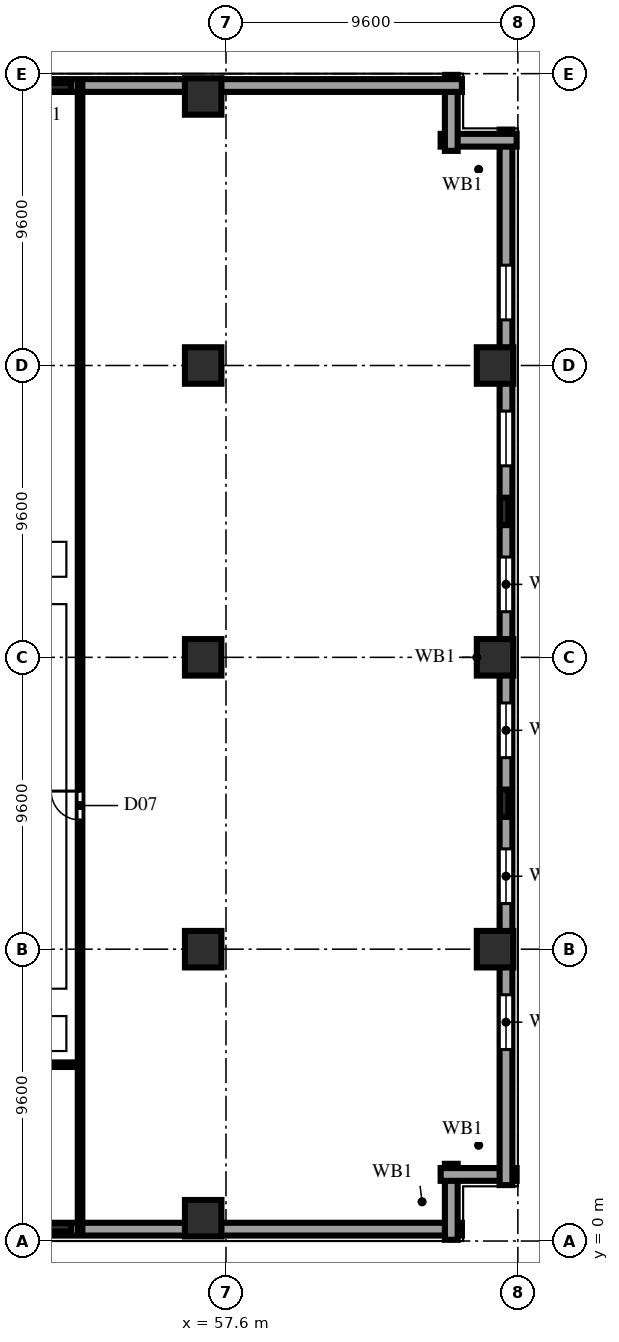
"""IFC4 building model, lengths in metres.
Left out: names, types, materials, properties, quantities, classifications, styles, units other than length and angle.
Written with IfcOpenShell. Run it as: python <this file> out.ifc"""

import sys

from ifc_helpers import new_model, si_unit, direction, frame, frame_2d, origin, origin_2d, place, context, subcontext, project, spatial, rectangle, extrude, element, fill, save


model = new_model("IFC4")
c1 = context("Model", 3, precision=1e-05, world=origin(), true_north=direction((0.0, 1.0)))
c2 = subcontext(c1, "Body", "Model", "MODEL_VIEW")
j1 = project(units=[si_unit("LENGTHUNIT", "METRE"), si_unit("PLANEANGLEUNIT", "RADIAN")], contexts=[c1])
p1 = place(None, origin())
s1 = spatial("IfcSite", under=j1, at=p1, CompositionType="ELEMENT")
p2 = place(p1, origin())
s2 = spatial("IfcBuilding", under=s1, at=p2, CompositionType="ELEMENT")
p3 = place(p2, frame((0.0, 0.0, 39.4)))
s3 = spatial("IfcBuildingStorey", under=s2, at=p3, CompositionType="ELEMENT", Elevation=39.4)
for number, where, z_axis, x_axis in (
    (1, (56.85, 0.75, 0.0), (0.0, 0.0, 1.0), (1.0, 0.0, 0.0)),
    (2, (56.85, 9.6, 0.0), (0.0, 0.0, 1.0), (1.0, 0.0, 0.0)),
    (3, (56.85, 19.2, 0.0), (0.0, 0.0, 1.0), (1.0, 0.0, 0.0)),
    (4, (56.85, 28.8, 0.0), (0.0, 0.0, 1.0), (1.0, 0.0, 0.0)),
    (5, (56.85, 37.65, 0.0), (0.0, 0.0, 1.0), (1.0, 0.0, 0.0)),
    (6, (66.45, 9.6, 0.0), (0.0, 0.0, 1.0), (1.0, 0.0, 0.0)),
    (7, (66.45, 19.2, 0.0), (0.0, 0.0, 1.0), (1.0, 0.0, 0.0)),
    (8, (66.45, 28.8, 0.0), (0.0, 0.0, 1.0), (1.0, 0.0, 0.0)),
):
    element("IfcColumn", number, at=place(p3, frame(where, z_axis=z_axis, x_axis=x_axis)), inside=s3, PredefinedType="COLUMN", context=c2, shape_type="SweptSolid", body=[
        extrude(rectangle(XDim=1.2, YDim=1.2, at=origin_2d()), origin(), (0.0, 0.0, 1.0), 3.8),
    ])
for number, where, z_axis, x_axis in (
    (9, (52.05, 0.45, 0.0), (0.0, 0.0, 1.0), (1.0, 0.0, 0.0)),
    (10, (66.75, 14.4, 0.0), (0.0, 0.0, 1.0), (0.0, 1.0, 0.0)),
    (11, (66.75, 24.0, 0.0), (0.0, 0.0, 1.0), (0.0, 1.0, 0.0)),
    (12, (52.05, 37.95, 0.0), (0.0, 0.0, 1.0), (1.0, 0.0, 0.0)),
):
    element("IfcColumn", number, at=place(p3, frame(where, z_axis=z_axis, x_axis=x_axis)), inside=s3, PredefinedType="PILASTER", context=c2, shape_type="SweptSolid", body=[
        extrude(rectangle(XDim=0.9, YDim=0.28, at=origin_2d()), origin(), (0.0, 0.0, 1.0), 3.8),
    ])
p4 = place(p3, frame((1.84, 0.39, 0.0), z_axis=(0.0, 0.0, 1.0), x_axis=(1.0, 0.0, 0.0)))
e13 = element("IfcWall", 13, at=p4, inside=s3, PredefinedType="SOLIDWALL", context=c2, shape_type="SweptSolid", body=[
    extrude(rectangle(XDim=63.52, YDim=0.42, at=frame_2d((31.76, 0.0))), origin(), (0.0, 0.0, 1.0), 3.54),
])
p5 = place(p4, frame((4.16, 0.0, 0.85)))
e14 = element("IfcOpeningElement", 14, at=p5, cuts=e13, PredefinedType="OPENING", context=c2, shape_type="SweptSolid", body=[
    extrude(rectangle(XDim=2.4, YDim=1.85, at=frame_2d((1.2, 0.925))), frame((0.0, 0.222, 0.0), z_axis=(0.0, -1.0, 0.0), x_axis=(1.0, 0.0, 0.0)), (0.0, 0.0, 1.0), 0.444),
])
p6 = place(p4, frame((13.76, 0.0, 0.85)))
e15 = element("IfcOpeningElement", 15, at=p6, cuts=e13, PredefinedType="OPENING", context=c2, shape_type="SweptSolid", body=[
    extrude(rectangle(XDim=2.4, YDim=1.85, at=frame_2d((1.2, 0.925))), frame((0.0, 0.222, 0.0), z_axis=(0.0, -1.0, 0.0), x_axis=(1.0, 0.0, 0.0)), (0.0, 0.0, 1.0), 0.444),
])
p7 = place(p4, frame((18.56, 0.0, 0.85)))
e16 = element("IfcOpeningElement", 16, at=p7, cuts=e13, PredefinedType="OPENING", context=c2, shape_type="SweptSolid", body=[
    extrude(rectangle(XDim=2.4, YDim=1.85, at=frame_2d((1.2, 0.925))), frame((0.0, 0.222, 0.0), z_axis=(0.0, -1.0, 0.0), x_axis=(1.0, 0.0, 0.0)), (0.0, 0.0, 1.0), 0.444),
])
p8 = place(p4, frame((28.16, 0.0, 0.85)))
e17 = element("IfcOpeningElement", 17, at=p8, cuts=e13, PredefinedType="OPENING", context=c2, shape_type="SweptSolid", body=[
    extrude(rectangle(XDim=2.4, YDim=1.85, at=frame_2d((1.2, 0.925))), frame((0.0, 0.222, 0.0), z_axis=(0.0, -1.0, 0.0), x_axis=(1.0, 0.0, 0.0)), (0.0, 0.0, 1.0), 0.444),
])
for number, where, z_axis, x_axis in (
    (18, (65.01, 0.04, 0.0), (0.0, 0.0, 1.0), (0.0, 1.0, 0.0)),
    (19, (64.66, 2.19, 0.0), (0.0, 0.0, 1.0), (1.0, 0.0, 0.0)),
):
    element("IfcWall", number, at=place(p3, frame(where, z_axis=z_axis, x_axis=x_axis)), inside=s3, PredefinedType="SOLIDWALL", context=c2, shape_type="SweptSolid", body=[
        extrude(rectangle(XDim=2.5, YDim=0.42, at=frame_2d((1.25, 0.0))), origin(), (0.0, 0.0, 1.0), 3.54),
    ])
p9 = place(p3, frame((66.81, 1.84, 0.0), z_axis=(0.0, 0.0, 1.0), x_axis=(0.0, 1.0, 0.0)))
e20 = element("IfcWall", 20, at=p9, inside=s3, PredefinedType="SOLIDWALL", context=c2, shape_type="SweptSolid", body=[
    extrude(rectangle(XDim=34.72, YDim=0.42, at=frame_2d((17.36, 0.0))), origin(), (0.0, 0.0, 1.0), 3.54),
])
p10 = place(p9, frame((4.46, 0.0, 0.85)))
e21 = element("IfcOpeningElement", 21, at=p10, cuts=e20, PredefinedType="OPENING", context=c2, shape_type="SweptSolid", body=[
    extrude(rectangle(XDim=1.8, YDim=1.85, at=frame_2d((0.9, 0.925))), frame((0.0, 0.222, 0.0), z_axis=(0.0, -1.0, 0.0), x_axis=(1.0, 0.0, 0.0)), (0.0, 0.0, 1.0), 0.444),
])
p11 = place(p9, frame((9.26, 0.0, 0.85)))
e22 = element("IfcOpeningElement", 22, at=p11, cuts=e20, PredefinedType="OPENING", context=c2, shape_type="SweptSolid", body=[
    extrude(rectangle(XDim=1.8, YDim=1.85, at=frame_2d((0.9, 0.925))), frame((0.0, 0.222, 0.0), z_axis=(0.0, -1.0, 0.0), x_axis=(1.0, 0.0, 0.0)), (0.0, 0.0, 1.0), 0.444),
])
p12 = place(p9, frame((14.06, 0.0, 0.85)))
e23 = element("IfcOpeningElement", 23, at=p12, cuts=e20, PredefinedType="OPENING", context=c2, shape_type="SweptSolid", body=[
    extrude(rectangle(XDim=1.8, YDim=1.85, at=frame_2d((0.9, 0.925))), frame((0.0, 0.222, 0.0), z_axis=(0.0, -1.0, 0.0), x_axis=(1.0, 0.0, 0.0)), (0.0, 0.0, 1.0), 0.444),
])
p13 = place(p9, frame((18.86, 0.0, 0.85)))
e24 = element("IfcOpeningElement", 24, at=p13, cuts=e20, PredefinedType="OPENING", context=c2, shape_type="SweptSolid", body=[
    extrude(rectangle(XDim=1.8, YDim=1.85, at=frame_2d((0.9, 0.925))), frame((0.0, 0.222, 0.0), z_axis=(0.0, -1.0, 0.0), x_axis=(1.0, 0.0, 0.0)), (0.0, 0.0, 1.0), 0.444),
])
p14 = place(p9, frame((23.66, 0.0, 0.85)))
e25 = element("IfcOpeningElement", 25, at=p14, cuts=e20, PredefinedType="OPENING", context=c2, shape_type="SweptSolid", body=[
    extrude(rectangle(XDim=1.8, YDim=1.85, at=frame_2d((0.9, 0.925))), frame((0.0, 0.222, 0.0), z_axis=(0.0, -1.0, 0.0), x_axis=(1.0, 0.0, 0.0)), (0.0, 0.0, 1.0), 0.444),
])
p15 = place(p9, frame((28.46, 0.0, 0.85)))
e26 = element("IfcOpeningElement", 26, at=p15, cuts=e20, PredefinedType="OPENING", context=c2, shape_type="SweptSolid", body=[
    extrude(rectangle(XDim=1.8, YDim=1.85, at=frame_2d((0.9, 0.925))), frame((0.0, 0.222, 0.0), z_axis=(0.0, -1.0, 0.0), x_axis=(1.0, 0.0, 0.0)), (0.0, 0.0, 1.0), 0.444),
])
for number, where, z_axis, x_axis in (
    (27, (67.16, 36.21, 0.0), (0.0, 0.0, 1.0), (-1.0, 0.0, 0.0)),
    (28, (65.01, 35.86, 0.0), (0.0, 0.0, 1.0), (0.0, 1.0, 0.0)),
):
    element("IfcWall", number, at=place(p3, frame(where, z_axis=z_axis, x_axis=x_axis)), inside=s3, PredefinedType="SOLIDWALL", context=c2, shape_type="SweptSolid", body=[
        extrude(rectangle(XDim=2.5, YDim=0.42, at=frame_2d((1.25, 0.0))), origin(), (0.0, 0.0, 1.0), 3.54),
    ])
p16 = place(p3, frame((65.36, 38.01, 0.0), z_axis=(0.0, 0.0, 1.0), x_axis=(-1.0, 0.0, 0.0)))
e29 = element("IfcWall", 29, at=p16, inside=s3, PredefinedType="SOLIDWALL", context=c2, shape_type="SweptSolid", body=[
    extrude(rectangle(XDim=27.7, YDim=0.42, at=frame_2d((13.85, 0.0))), origin(), (0.0, 0.0, 1.0), 3.54),
])
p17 = place(p3, frame((0.22, 5.8, 0.0), z_axis=(0.0, 0.0, 1.0), x_axis=(1.0, 0.0, 0.0)))
e30 = element("IfcWall", 30, at=p17, inside=s3, PredefinedType="PARTITIONING", context=c2, shape_type="SweptSolid", body=[
    extrude(rectangle(XDim=52.58, YDim=0.15, at=frame_2d((26.29, 0.0))), origin(), (0.0, 0.0, 1.0), 3.54),
])
p18 = place(p17, frame((10.18, 0.0, 0.0)))
e31 = element("IfcOpeningElement", 31, at=p18, cuts=e30, PredefinedType="OPENING", context=c2, shape_type="SweptSolid", body=[
    extrude(rectangle(XDim=0.95, YDim=2.15, at=frame_2d((0.475, 1.075))), frame((0.0, 0.087, 0.0), z_axis=(0.0, -1.0, 0.0), x_axis=(1.0, 0.0, 0.0)), (0.0, 0.0, 1.0), 0.174),
])
p19 = place(p17, frame((13.58, 0.0, 0.0)))
e32 = element("IfcOpeningElement", 32, at=p19, cuts=e30, PredefinedType="OPENING", context=c2, shape_type="SweptSolid", body=[
    extrude(rectangle(XDim=0.95, YDim=2.15, at=frame_2d((0.475, 1.075))), frame((0.0, 0.087, 0.0), z_axis=(0.0, -1.0, 0.0), x_axis=(1.0, 0.0, 0.0)), (0.0, 0.0, 1.0), 0.174),
])
p20 = place(p17, frame((32.53, 0.0, 0.0)))
e33 = element("IfcOpeningElement", 33, at=p20, cuts=e30, PredefinedType="OPENING", context=c2, shape_type="SweptSolid", body=[
    extrude(rectangle(XDim=0.95, YDim=2.15, at=frame_2d((0.475, 1.075))), frame((0.0, 0.087, 0.0), z_axis=(0.0, -1.0, 0.0), x_axis=(1.0, 0.0, 0.0)), (0.0, 0.0, 1.0), 0.174),
])
p21 = place(p17, frame((41.63, 0.0, 0.0)))
e34 = element("IfcOpeningElement", 34, at=p21, cuts=e30, PredefinedType="OPENING", context=c2, shape_type="SweptSolid", body=[
    extrude(rectangle(XDim=0.95, YDim=2.15, at=frame_2d((0.475, 1.075))), frame((0.0, 0.087, 0.0), z_axis=(0.0, -1.0, 0.0), x_axis=(1.0, 0.0, 0.0)), (0.0, 0.0, 1.0), 0.174),
])
p22 = place(p3, frame((52.8, 0.22, 0.0), z_axis=(0.0, 0.0, 1.0), x_axis=(0.0, 1.0, 0.0)))
e35 = element("IfcWall", 35, at=p22, inside=s3, PredefinedType="PARTITIONING", context=c2, shape_type="SweptSolid", body=[
    extrude(rectangle(XDim=37.96, YDim=0.15, at=frame_2d((18.98, 0.0))), origin(), (0.0, 0.0, 1.0), 3.54),
])
p23 = place(p22, frame((13.63, 0.0, 0.0)))
e36 = element("IfcOpeningElement", 36, at=p23, cuts=e35, PredefinedType="OPENING", context=c2, shape_type="SweptSolid", body=[
    extrude(rectangle(XDim=0.95, YDim=2.15, at=frame_2d((0.475, 1.075))), frame((0.0, 0.087, 0.0), z_axis=(0.0, -1.0, 0.0), x_axis=(1.0, 0.0, 0.0)), (0.0, 0.0, 1.0), 0.174),
])
p24 = place(p10, origin())
e37 = element("IfcWindow", 37, at=p24, inside=s3, PartitioningType="DOUBLE_PANEL_VERTICAL", PredefinedType="WINDOW", context=c2, shape_type="SweptSolid", body=[
    extrude(rectangle(XDim=1.8, YDim=1.85, at=frame_2d((0.9, 0.925))), frame((0.0, 0.11, 0.0), z_axis=(0.0, -1.0, 0.0), x_axis=(1.0, 0.0, 0.0)), (0.0, 0.0, 1.0), 0.06),
])
fill(e21, e37)
p25 = place(p11, origin())
e38 = element("IfcWindow", 38, at=p25, inside=s3, PartitioningType="DOUBLE_PANEL_VERTICAL", PredefinedType="WINDOW", context=c2, shape_type="SweptSolid", body=[
    extrude(rectangle(XDim=1.8, YDim=1.85, at=frame_2d((0.9, 0.925))), frame((0.0, 0.11, 0.0), z_axis=(0.0, -1.0, 0.0), x_axis=(1.0, 0.0, 0.0)), (0.0, 0.0, 1.0), 0.06),
])
fill(e22, e38)
p26 = place(p12, origin())
e39 = element("IfcWindow", 39, at=p26, inside=s3, PartitioningType="DOUBLE_PANEL_VERTICAL", PredefinedType="WINDOW", context=c2, shape_type="SweptSolid", body=[
    extrude(rectangle(XDim=1.8, YDim=1.85, at=frame_2d((0.9, 0.925))), frame((0.0, 0.11, 0.0), z_axis=(0.0, -1.0, 0.0), x_axis=(1.0, 0.0, 0.0)), (0.0, 0.0, 1.0), 0.06),
])
fill(e23, e39)
p27 = place(p13, origin())
e40 = element("IfcWindow", 40, at=p27, inside=s3, PartitioningType="DOUBLE_PANEL_VERTICAL", PredefinedType="WINDOW", context=c2, shape_type="SweptSolid", body=[
    extrude(rectangle(XDim=1.8, YDim=1.85, at=frame_2d((0.9, 0.925))), frame((0.0, 0.11, 0.0), z_axis=(0.0, -1.0, 0.0), x_axis=(1.0, 0.0, 0.0)), (0.0, 0.0, 1.0), 0.06),
])
fill(e24, e40)
p28 = place(p14, origin())
e41 = element("IfcWindow", 41, at=p28, inside=s3, PartitioningType="DOUBLE_PANEL_VERTICAL", PredefinedType="WINDOW", context=c2, shape_type="SweptSolid", body=[
    extrude(rectangle(XDim=1.8, YDim=1.85, at=frame_2d((0.9, 0.925))), frame((0.0, 0.11, 0.0), z_axis=(0.0, -1.0, 0.0), x_axis=(1.0, 0.0, 0.0)), (0.0, 0.0, 1.0), 0.06),
])
fill(e25, e41)
p29 = place(p15, origin())
e42 = element("IfcWindow", 42, at=p29, inside=s3, PartitioningType="DOUBLE_PANEL_VERTICAL", PredefinedType="WINDOW", context=c2, shape_type="SweptSolid", body=[
    extrude(rectangle(XDim=1.8, YDim=1.85, at=frame_2d((0.9, 0.925))), frame((0.0, 0.11, 0.0), z_axis=(0.0, -1.0, 0.0), x_axis=(1.0, 0.0, 0.0)), (0.0, 0.0, 1.0), 0.06),
])
fill(e26, e42)
p30 = place(p23, origin())
e43 = element("IfcDoor", 43, at=p30, inside=s3, OperationType="SINGLE_SWING_RIGHT", PredefinedType="DOOR", context=c2, shape_type="SweptSolid", body=[
    extrude(rectangle(XDim=0.95, YDim=2.15, at=frame_2d((0.475, 1.075))), frame((0.0, 0.025, 0.0), z_axis=(0.0, -1.0, 0.0), x_axis=(1.0, 0.0, 0.0)), (0.0, 0.0, 1.0), 0.05),
])
fill(e36, e43)
save(model, sys.argv[1])
